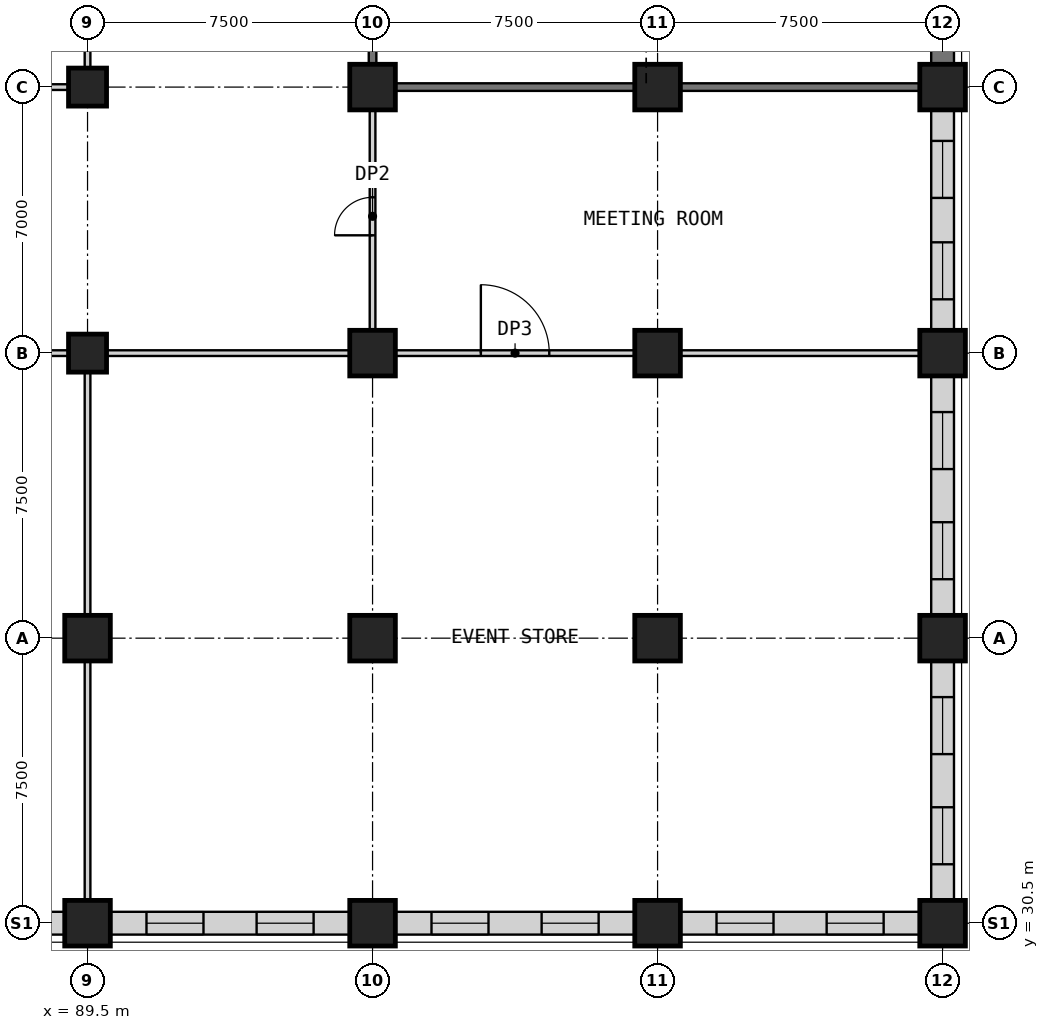
"""IFC4 building model, lengths in metres.
Left out: names, types, materials, properties, quantities, classifications, styles, units other than length and angle.
Written with IfcOpenShell. Run it as: python <this file> out.ifc"""

import sys

from ifc_helpers import new_model, si_unit, direction, frame, frame_2d, origin, origin_2d, place, context, subcontext, project, spatial, rectangle, extrude, element, fill, save


model = new_model("IFC4")
c1 = context("Model", 3, precision=1e-05, world=origin(), true_north=direction((0.0, 1.0)))
c2 = subcontext(c1, "Body", "Model", "MODEL_VIEW")
j1 = project(units=[si_unit("LENGTHUNIT", "METRE"), si_unit("PLANEANGLEUNIT", "RADIAN")], contexts=[c1])
p1 = place(None, origin())
s1 = spatial("IfcSite", under=j1, at=p1, CompositionType="ELEMENT")
p2 = place(p1, origin())
s2 = spatial("IfcBuilding", under=s1, at=p2, CompositionType="ELEMENT")
p3 = place(p2, frame((0.0, 0.0, 23.5)))
s3 = spatial("IfcBuildingStorey", under=s2, at=p3, CompositionType="ELEMENT", Elevation=23.5)
for number, where, z_axis, x_axis in (
    (1, (89.5, 45.5, 0.0), (0.0, 0.0, 1.0), (1.0, 0.0, 0.0)),
    (2, (89.5, 52.5, 0.0), (0.0, 0.0, 1.0), (1.0, 0.0, 0.0)),
):
    element("IfcColumn", number, at=place(p3, frame(where, z_axis=z_axis, x_axis=x_axis)), inside=s3, PredefinedType="COLUMN", context=c2, shape_type="SweptSolid", body=[
        extrude(rectangle(XDim=1.0, YDim=1.0, at=origin_2d()), origin(), (0.0, 0.0, 1.0), 5.5),
    ])
for number, where, z_axis, x_axis in (
    (3, (89.5, 30.5, 0.0), (0.0, 0.0, 1.0), (1.0, 0.0, 0.0)),
    (4, (89.5, 38.0, 0.0), (0.0, 0.0, 1.0), (1.0, 0.0, 0.0)),
    (5, (97.0, 30.5, 0.0), (0.0, 0.0, 1.0), (1.0, 0.0, 0.0)),
    (6, (97.0, 38.0, 0.0), (0.0, 0.0, 1.0), (1.0, 0.0, 0.0)),
    (7, (97.0, 45.5, 0.0), (0.0, 0.0, 1.0), (1.0, 0.0, 0.0)),
    (8, (97.0, 52.5, 0.0), (0.0, 0.0, 1.0), (1.0, 0.0, 0.0)),
    (9, (104.5, 30.5, 0.0), (0.0, 0.0, 1.0), (1.0, 0.0, 0.0)),
    (10, (104.5, 38.0, 0.0), (0.0, 0.0, 1.0), (1.0, 0.0, 0.0)),
    (11, (104.5, 45.5, 0.0), (0.0, 0.0, 1.0), (1.0, 0.0, 0.0)),
    (12, (104.5, 52.5, 0.0), (0.0, 0.0, 1.0), (1.0, 0.0, 0.0)),
    (13, (112.0, 30.5, 0.0), (0.0, 0.0, 1.0), (1.0, 0.0, 0.0)),
    (14, (112.0, 38.0, 0.0), (0.0, 0.0, 1.0), (1.0, 0.0, 0.0)),
    (15, (112.0, 45.5, 0.0), (0.0, 0.0, 1.0), (1.0, 0.0, 0.0)),
    (16, (112.0, 52.5, 0.0), (0.0, 0.0, 1.0), (1.0, 0.0, 0.0)),
):
    element("IfcColumn", number, at=place(p3, frame(where, z_axis=z_axis, x_axis=x_axis)), inside=s3, PredefinedType="COLUMN", context=c2, shape_type="SweptSolid", body=[
        extrude(rectangle(XDim=1.2, YDim=1.2, at=origin_2d()), origin(), (0.0, 0.0, 1.0), 5.5),
    ])
p4 = place(p3, frame((82.6, 30.5, 0.0), z_axis=(0.0, 0.0, 1.0), x_axis=(1.0, 0.0, 0.0)))
e17 = element("IfcWall", 17, at=p4, inside=s3, PredefinedType="PARTITIONING", context=c2, shape_type="SweptSolid", body=[
    extrude(rectangle(XDim=6.3, YDim=0.6, at=frame_2d((3.15, 0.0))), origin(), (0.0, 0.0, 1.0), 4.6),
])
p5 = place(p4, frame((0.951, 0.0, 0.9)))
e18 = element("IfcOpeningElement", 18, at=p5, cuts=e17, PredefinedType="OPENING", context=c2, shape_type="SweptSolid", body=[
    extrude(rectangle(XDim=1.5, YDim=2.8, at=frame_2d((0.75, 1.4))), frame((0.0, 0.31, 0.0), z_axis=(0.0, -1.0, 0.0), x_axis=(1.0, 0.0, 0.0)), (0.0, 0.0, 1.0), 0.62),
])
p6 = place(p4, frame((3.849, 0.0, 0.9)))
e19 = element("IfcOpeningElement", 19, at=p6, cuts=e17, PredefinedType="OPENING", context=c2, shape_type="SweptSolid", body=[
    extrude(rectangle(XDim=1.5, YDim=2.8, at=frame_2d((0.75, 1.4))), frame((0.0, 0.31, 0.0), z_axis=(0.0, -1.0, 0.0), x_axis=(1.0, 0.0, 0.0)), (0.0, 0.0, 1.0), 0.62),
])
p7 = place(p3, frame((90.1, 30.5, 0.0), z_axis=(0.0, 0.0, 1.0), x_axis=(1.0, 0.0, 0.0)))
e20 = element("IfcWall", 20, at=p7, inside=s3, PredefinedType="PARTITIONING", context=c2, shape_type="SweptSolid", body=[
    extrude(rectangle(XDim=6.3, YDim=0.6, at=frame_2d((3.15, 0.0))), origin(), (0.0, 0.0, 1.0), 4.6),
])
p8 = place(p7, frame((0.951, 0.0, 0.9)))
e21 = element("IfcOpeningElement", 21, at=p8, cuts=e20, PredefinedType="OPENING", context=c2, shape_type="SweptSolid", body=[
    extrude(rectangle(XDim=1.5, YDim=2.8, at=frame_2d((0.75, 1.4))), frame((0.0, 0.31, 0.0), z_axis=(0.0, -1.0, 0.0), x_axis=(1.0, 0.0, 0.0)), (0.0, 0.0, 1.0), 0.62),
])
p9 = place(p7, frame((3.849, 0.0, 0.9)))
e22 = element("IfcOpeningElement", 22, at=p9, cuts=e20, PredefinedType="OPENING", context=c2, shape_type="SweptSolid", body=[
    extrude(rectangle(XDim=1.5, YDim=2.8, at=frame_2d((0.75, 1.4))), frame((0.0, 0.31, 0.0), z_axis=(0.0, -1.0, 0.0), x_axis=(1.0, 0.0, 0.0)), (0.0, 0.0, 1.0), 0.62),
])
p10 = place(p3, frame((97.6, 30.5, 0.0), z_axis=(0.0, 0.0, 1.0), x_axis=(1.0, 0.0, 0.0)))
e23 = element("IfcWall", 23, at=p10, inside=s3, PredefinedType="PARTITIONING", context=c2, shape_type="SweptSolid", body=[
    extrude(rectangle(XDim=6.3, YDim=0.6, at=frame_2d((3.15, 0.0))), origin(), (0.0, 0.0, 1.0), 4.6),
])
p11 = place(p10, frame((0.951, 0.0, 0.9)))
e24 = element("IfcOpeningElement", 24, at=p11, cuts=e23, PredefinedType="OPENING", context=c2, shape_type="SweptSolid", body=[
    extrude(rectangle(XDim=1.5, YDim=2.8, at=frame_2d((0.75, 1.4))), frame((0.0, 0.31, 0.0), z_axis=(0.0, -1.0, 0.0), x_axis=(1.0, 0.0, 0.0)), (0.0, 0.0, 1.0), 0.62),
])
p12 = place(p10, frame((3.849, 0.0, 0.9)))
e25 = element("IfcOpeningElement", 25, at=p12, cuts=e23, PredefinedType="OPENING", context=c2, shape_type="SweptSolid", body=[
    extrude(rectangle(XDim=1.5, YDim=2.8, at=frame_2d((0.75, 1.4))), frame((0.0, 0.31, 0.0), z_axis=(0.0, -1.0, 0.0), x_axis=(1.0, 0.0, 0.0)), (0.0, 0.0, 1.0), 0.62),
])
p13 = place(p3, frame((105.1, 30.5, 0.0), z_axis=(0.0, 0.0, 1.0), x_axis=(1.0, 0.0, 0.0)))
e26 = element("IfcWall", 26, at=p13, inside=s3, PredefinedType="PARTITIONING", context=c2, shape_type="SweptSolid", body=[
    extrude(rectangle(XDim=6.3, YDim=0.6, at=frame_2d((3.15, 0.0))), origin(), (0.0, 0.0, 1.0), 4.6),
])
p14 = place(p13, frame((0.951, 0.0, 0.9)))
e27 = element("IfcOpeningElement", 27, at=p14, cuts=e26, PredefinedType="OPENING", context=c2, shape_type="SweptSolid", body=[
    extrude(rectangle(XDim=1.5, YDim=2.8, at=frame_2d((0.75, 1.4))), frame((0.0, 0.31, 0.0), z_axis=(0.0, -1.0, 0.0), x_axis=(1.0, 0.0, 0.0)), (0.0, 0.0, 1.0), 0.62),
])
p15 = place(p13, frame((3.849, 0.0, 0.9)))
e28 = element("IfcOpeningElement", 28, at=p15, cuts=e26, PredefinedType="OPENING", context=c2, shape_type="SweptSolid", body=[
    extrude(rectangle(XDim=1.5, YDim=2.8, at=frame_2d((0.75, 1.4))), frame((0.0, 0.31, 0.0), z_axis=(0.0, -1.0, 0.0), x_axis=(1.0, 0.0, 0.0)), (0.0, 0.0, 1.0), 0.62),
])
for number, where, z_axis, x_axis in (
    (29, (82.6, 45.5, 0.0), (0.0, 0.0, 1.0), (1.0, 0.0, 0.0)),
    (30, (90.0, 45.5, 0.0), (0.0, 0.0, 1.0), (1.0, 0.0, 0.0)),
):
    element("IfcWall", number, at=place(p3, frame(where, z_axis=z_axis, x_axis=x_axis)), inside=s3, PredefinedType="PARTITIONING", context=c2, shape_type="SweptSolid", body=[
        extrude(rectangle(XDim=6.4, YDim=0.15, at=frame_2d((3.2, 0.0))), origin(), (0.0, 0.0, 1.0), 5.2),
    ])
p16 = place(p3, frame((97.6, 45.5, 0.0), z_axis=(0.0, 0.0, 1.0), x_axis=(1.0, 0.0, 0.0)))
e31 = element("IfcWall", 31, at=p16, inside=s3, PredefinedType="PARTITIONING", context=c2, shape_type="SweptSolid", body=[
    extrude(rectangle(XDim=6.3, YDim=0.15, at=frame_2d((3.15, 0.0))), origin(), (0.0, 0.0, 1.0), 5.2),
])
p17 = place(p16, frame((2.25, 0.0, 0.0)))
e32 = element("IfcOpeningElement", 32, at=p17, cuts=e31, PredefinedType="OPENING", context=c2, shape_type="SweptSolid", body=[
    extrude(rectangle(XDim=1.8, YDim=2.4, at=frame_2d((0.9, 1.2))), frame((0.0, 0.085, 0.0), z_axis=(0.0, -1.0, 0.0), x_axis=(1.0, 0.0, 0.0)), (0.0, 0.0, 1.0), 0.17),
])
p18 = place(p3, frame((105.1, 45.5, 0.0), z_axis=(0.0, 0.0, 1.0), x_axis=(1.0, 0.0, 0.0)))
e33 = element("IfcWall", 33, at=p18, inside=s3, PredefinedType="PARTITIONING", context=c2, shape_type="SweptSolid", body=[
    extrude(rectangle(XDim=6.3, YDim=0.15, at=frame_2d((3.15, 0.0))), origin(), (0.0, 0.0, 1.0), 5.2),
])
p19 = place(p3, frame((89.0, 52.5, 0.0), z_axis=(0.0, 0.0, 1.0), x_axis=(-1.0, 0.0, 0.0)))
e34 = element("IfcWall", 34, at=p19, inside=s3, PredefinedType="PARTITIONING", context=c2, shape_type="SweptSolid", body=[
    extrude(rectangle(XDim=6.4, YDim=0.15, at=frame_2d((3.2, 0.0))), origin(), (0.0, 0.0, 1.0), 5.2),
])
p20 = place(p19, frame((4.1, 0.0, 0.0)))
e35 = element("IfcOpeningElement", 35, at=p20, cuts=e34, PredefinedType="OPENING", context=c2, shape_type="SweptSolid", body=[
    extrude(rectangle(XDim=1.8, YDim=2.4, at=frame_2d((0.9, 1.2))), frame((0.0, 0.085, 0.0), z_axis=(0.0, -1.0, 0.0), x_axis=(1.0, 0.0, 0.0)), (0.0, 0.0, 1.0), 0.17),
])
for number, where, z_axis, x_axis in (
    (36, (97.6, 52.5, 0.0), (0.0, 0.0, 1.0), (1.0, 0.0, 0.0)),
    (37, (105.1, 52.5, 0.0), (0.0, 0.0, 1.0), (1.0, 0.0, 0.0)),
):
    element("IfcWall", number, at=place(p3, frame(where, z_axis=z_axis, x_axis=x_axis)), inside=s3, PredefinedType="SHEAR", context=c2, shape_type="SweptSolid", body=[
        extrude(rectangle(XDim=6.3, YDim=0.2, at=frame_2d((3.15, 0.0))), origin(), (0.0, 0.0, 1.0), 5.2),
    ])
p21 = place(p3, frame((97.0, 46.1, 0.0), z_axis=(0.0, 0.0, 1.0), x_axis=(0.0, 1.0, 0.0)))
e38 = element("IfcWall", 38, at=p21, inside=s3, PredefinedType="PARTITIONING", context=c2, shape_type="SweptSolid", body=[
    extrude(rectangle(XDim=5.8, YDim=0.15, at=frame_2d((2.9, 0.0))), origin(), (0.0, 0.0, 1.0), 5.2),
])
p22 = place(p21, frame((2.5, 0.0, 0.0)))
e39 = element("IfcOpeningElement", 39, at=p22, cuts=e38, PredefinedType="OPENING", context=c2, shape_type="SweptSolid", body=[
    extrude(rectangle(XDim=1.0, YDim=2.1, at=frame_2d((0.5, 1.05))), frame((0.0, 0.085, 0.0), z_axis=(0.0, -1.0, 0.0), x_axis=(1.0, 0.0, 0.0)), (0.0, 0.0, 1.0), 0.17),
])
p23 = place(p3, frame((97.0, 59.4, 0.0), z_axis=(0.0, 0.0, 1.0), x_axis=(0.0, -1.0, 0.0)))
e40 = element("IfcWall", 40, at=p23, inside=s3, PredefinedType="SHEAR", context=c2, shape_type="SweptSolid", body=[
    extrude(rectangle(XDim=6.3, YDim=0.2, at=frame_2d((3.15, 0.0))), origin(), (0.0, 0.0, 1.0), 5.2),
])
p24 = place(p23, frame((2.6, 0.0, 0.0)))
e41 = element("IfcOpeningElement", 41, at=p24, cuts=e40, PredefinedType="OPENING", context=c2, shape_type="SweptSolid", body=[
    extrude(rectangle(XDim=1.2, YDim=2.1, at=frame_2d((0.6, 1.05))), frame((0.0, 0.11, 0.0), z_axis=(0.0, -1.0, 0.0), x_axis=(1.0, 0.0, 0.0)), (0.0, 0.0, 1.0), 0.22),
])
p25 = place(p3, frame((112.0, 31.1, 0.0), z_axis=(0.0, 0.0, 1.0), x_axis=(0.0, 1.0, 0.0)))
e42 = element("IfcWall", 42, at=p25, inside=s3, PredefinedType="PARTITIONING", context=c2, shape_type="SweptSolid", body=[
    extrude(rectangle(XDim=6.3, YDim=0.6, at=frame_2d((3.15, 0.0))), origin(), (0.0, 0.0, 1.0), 4.6),
])
p26 = place(p25, frame((0.951, 0.0, 0.9)))
e43 = element("IfcOpeningElement", 43, at=p26, cuts=e42, PredefinedType="OPENING", context=c2, shape_type="SweptSolid", body=[
    extrude(rectangle(XDim=1.5, YDim=2.8, at=frame_2d((0.75, 1.4))), frame((0.0, 0.31, 0.0), z_axis=(0.0, -1.0, 0.0), x_axis=(1.0, 0.0, 0.0)), (0.0, 0.0, 1.0), 0.62),
])
p27 = place(p25, frame((3.849, 0.0, 0.9)))
e44 = element("IfcOpeningElement", 44, at=p27, cuts=e42, PredefinedType="OPENING", context=c2, shape_type="SweptSolid", body=[
    extrude(rectangle(XDim=1.5, YDim=2.8, at=frame_2d((0.75, 1.4))), frame((0.0, 0.31, 0.0), z_axis=(0.0, -1.0, 0.0), x_axis=(1.0, 0.0, 0.0)), (0.0, 0.0, 1.0), 0.62),
])
p28 = place(p3, frame((112.0, 38.6, 0.0), z_axis=(0.0, 0.0, 1.0), x_axis=(0.0, 1.0, 0.0)))
e45 = element("IfcWall", 45, at=p28, inside=s3, PredefinedType="PARTITIONING", context=c2, shape_type="SweptSolid", body=[
    extrude(rectangle(XDim=6.3, YDim=0.6, at=frame_2d((3.15, 0.0))), origin(), (0.0, 0.0, 1.0), 4.6),
])
p29 = place(p28, frame((0.951, 0.0, 0.9)))
e46 = element("IfcOpeningElement", 46, at=p29, cuts=e45, PredefinedType="OPENING", context=c2, shape_type="SweptSolid", body=[
    extrude(rectangle(XDim=1.5, YDim=2.8, at=frame_2d((0.75, 1.4))), frame((0.0, 0.31, 0.0), z_axis=(0.0, -1.0, 0.0), x_axis=(1.0, 0.0, 0.0)), (0.0, 0.0, 1.0), 0.62),
])
p30 = place(p28, frame((3.849, 0.0, 0.9)))
e47 = element("IfcOpeningElement", 47, at=p30, cuts=e45, PredefinedType="OPENING", context=c2, shape_type="SweptSolid", body=[
    extrude(rectangle(XDim=1.5, YDim=2.8, at=frame_2d((0.75, 1.4))), frame((0.0, 0.31, 0.0), z_axis=(0.0, -1.0, 0.0), x_axis=(1.0, 0.0, 0.0)), (0.0, 0.0, 1.0), 0.62),
])
p31 = place(p3, frame((112.0, 46.1, 0.0), z_axis=(0.0, 0.0, 1.0), x_axis=(0.0, 1.0, 0.0)))
e48 = element("IfcWall", 48, at=p31, inside=s3, PredefinedType="PARTITIONING", context=c2, shape_type="SweptSolid", body=[
    extrude(rectangle(XDim=5.8, YDim=0.6, at=frame_2d((2.9, 0.0))), origin(), (0.0, 0.0, 1.0), 4.6),
])
p32 = place(p31, frame((0.816, 0.0, 0.9)))
e49 = element("IfcOpeningElement", 49, at=p32, cuts=e48, PredefinedType="OPENING", context=c2, shape_type="SweptSolid", body=[
    extrude(rectangle(XDim=1.5, YDim=2.8, at=frame_2d((0.75, 1.4))), frame((0.0, 0.31, 0.0), z_axis=(0.0, -1.0, 0.0), x_axis=(1.0, 0.0, 0.0)), (0.0, 0.0, 1.0), 0.62),
])
p33 = place(p31, frame((3.484, 0.0, 0.9)))
e50 = element("IfcOpeningElement", 50, at=p33, cuts=e48, PredefinedType="OPENING", context=c2, shape_type="SweptSolid", body=[
    extrude(rectangle(XDim=1.5, YDim=2.8, at=frame_2d((0.75, 1.4))), frame((0.0, 0.31, 0.0), z_axis=(0.0, -1.0, 0.0), x_axis=(1.0, 0.0, 0.0)), (0.0, 0.0, 1.0), 0.62),
])
p34 = place(p3, frame((112.0, 53.1, 0.0), z_axis=(0.0, 0.0, 1.0), x_axis=(0.0, 1.0, 0.0)))
e51 = element("IfcWall", 51, at=p34, inside=s3, PredefinedType="PARTITIONING", context=c2, shape_type="SweptSolid", body=[
    extrude(rectangle(XDim=6.3, YDim=0.6, at=frame_2d((3.15, 0.0))), origin(), (0.0, 0.0, 1.0), 4.6),
])
p35 = place(p3, frame((89.5, 31.1, 0.0), z_axis=(0.0, 0.0, 1.0), x_axis=(0.0, 1.0, 0.0)))
e52 = element("IfcWall", 52, at=p35, inside=s3, PredefinedType="PARTITIONING", context=c2, shape_type="SweptSolid", body=[
    extrude(rectangle(XDim=6.3, YDim=0.15, at=frame_2d((3.15, 0.0))), origin(), (0.0, 0.0, 1.0), 5.2),
])
p36 = place(p3, frame((89.5, 38.6, 0.0), z_axis=(0.0, 0.0, 1.0), x_axis=(0.0, 1.0, 0.0)))
e53 = element("IfcWall", 53, at=p36, inside=s3, PredefinedType="PARTITIONING", context=c2, shape_type="SweptSolid", body=[
    extrude(rectangle(XDim=6.4, YDim=0.15, at=frame_2d((3.2, 0.0))), origin(), (0.0, 0.0, 1.0), 5.2),
])
p37 = place(p3, frame((89.5, 53.0, 0.0), z_axis=(0.0, 0.0, 1.0), x_axis=(0.0, 1.0, 0.0)))
e54 = element("IfcWall", 54, at=p37, inside=s3, PredefinedType="PARTITIONING", context=c2, shape_type="SweptSolid", body=[
    extrude(rectangle(XDim=6.5, YDim=0.15, at=frame_2d((3.25, 0.0))), origin(), (0.0, 0.0, 1.0), 5.2),
])
p38 = place(p8, origin())
e55 = element("IfcWindow", 55, at=p38, inside=s3, PartitioningType="SINGLE_PANEL", PredefinedType="WINDOW", context=c2, shape_type="SweptSolid", body=[
    extrude(rectangle(XDim=1.5, YDim=2.8, at=frame_2d((0.75, 1.4))), frame((0.0, 0.03, 0.0), z_axis=(0.0, -1.0, 0.0), x_axis=(1.0, 0.0, 0.0)), (0.0, 0.0, 1.0), 0.06),
])
fill(e21, e55)
p39 = place(p9, origin())
e56 = element("IfcWindow", 56, at=p39, inside=s3, PartitioningType="SINGLE_PANEL", PredefinedType="WINDOW", context=c2, shape_type="SweptSolid", body=[
    extrude(rectangle(XDim=1.5, YDim=2.8, at=frame_2d((0.75, 1.4))), frame((0.0, 0.03, 0.0), z_axis=(0.0, -1.0, 0.0), x_axis=(1.0, 0.0, 0.0)), (0.0, 0.0, 1.0), 0.06),
])
fill(e22, e56)
p40 = place(p11, origin())
e57 = element("IfcWindow", 57, at=p40, inside=s3, PartitioningType="SINGLE_PANEL", PredefinedType="WINDOW", context=c2, shape_type="SweptSolid", body=[
    extrude(rectangle(XDim=1.5, YDim=2.8, at=frame_2d((0.75, 1.4))), frame((0.0, 0.03, 0.0), z_axis=(0.0, -1.0, 0.0), x_axis=(1.0, 0.0, 0.0)), (0.0, 0.0, 1.0), 0.06),
])
fill(e24, e57)
p41 = place(p12, origin())
e58 = element("IfcWindow", 58, at=p41, inside=s3, PartitioningType="SINGLE_PANEL", PredefinedType="WINDOW", context=c2, shape_type="SweptSolid", body=[
    extrude(rectangle(XDim=1.5, YDim=2.8, at=frame_2d((0.75, 1.4))), frame((0.0, 0.03, 0.0), z_axis=(0.0, -1.0, 0.0), x_axis=(1.0, 0.0, 0.0)), (0.0, 0.0, 1.0), 0.06),
])
fill(e25, e58)
p42 = place(p14, origin())
e59 = element("IfcWindow", 59, at=p42, inside=s3, PartitioningType="SINGLE_PANEL", PredefinedType="WINDOW", context=c2, shape_type="SweptSolid", body=[
    extrude(rectangle(XDim=1.5, YDim=2.8, at=frame_2d((0.75, 1.4))), frame((0.0, 0.03, 0.0), z_axis=(0.0, -1.0, 0.0), x_axis=(1.0, 0.0, 0.0)), (0.0, 0.0, 1.0), 0.06),
])
fill(e27, e59)
p43 = place(p15, origin())
e60 = element("IfcWindow", 60, at=p43, inside=s3, PartitioningType="SINGLE_PANEL", PredefinedType="WINDOW", context=c2, shape_type="SweptSolid", body=[
    extrude(rectangle(XDim=1.5, YDim=2.8, at=frame_2d((0.75, 1.4))), frame((0.0, 0.03, 0.0), z_axis=(0.0, -1.0, 0.0), x_axis=(1.0, 0.0, 0.0)), (0.0, 0.0, 1.0), 0.06),
])
fill(e28, e60)
p44 = place(p17, origin())
e61 = element("IfcDoor", 61, at=p44, inside=s3, OperationType="SINGLE_SWING_LEFT", PredefinedType="DOOR", context=c2, shape_type="SweptSolid", body=[
    extrude(rectangle(XDim=1.8, YDim=2.4, at=frame_2d((0.9, 1.2))), frame((0.0, 0.025, 0.0), z_axis=(0.0, -1.0, 0.0), x_axis=(1.0, 0.0, 0.0)), (0.0, 0.0, 1.0), 0.05),
])
fill(e32, e61)
p45 = place(p22, origin())
e62 = element("IfcDoor", 62, at=p45, inside=s3, OperationType="SINGLE_SWING_LEFT", PredefinedType="DOOR", context=c2, shape_type="SweptSolid", body=[
    extrude(rectangle(XDim=1.0, YDim=2.1, at=frame_2d((0.5, 1.05))), frame((0.0, 0.025, 0.0), z_axis=(0.0, -1.0, 0.0), x_axis=(1.0, 0.0, 0.0)), (0.0, 0.0, 1.0), 0.05),
])
fill(e39, e62)
p46 = place(p26, origin())
e63 = element("IfcWindow", 63, at=p46, inside=s3, PartitioningType="SINGLE_PANEL", PredefinedType="WINDOW", context=c2, shape_type="SweptSolid", body=[
    extrude(rectangle(XDim=1.5, YDim=2.8, at=frame_2d((0.75, 1.4))), frame((0.0, 0.03, 0.0), z_axis=(0.0, -1.0, 0.0), x_axis=(1.0, 0.0, 0.0)), (0.0, 0.0, 1.0), 0.06),
])
fill(e43, e63)
p47 = place(p27, origin())
e64 = element("IfcWindow", 64, at=p47, inside=s3, PartitioningType="SINGLE_PANEL", PredefinedType="WINDOW", context=c2, shape_type="SweptSolid", body=[
    extrude(rectangle(XDim=1.5, YDim=2.8, at=frame_2d((0.75, 1.4))), frame((0.0, 0.03, 0.0), z_axis=(0.0, -1.0, 0.0), x_axis=(1.0, 0.0, 0.0)), (0.0, 0.0, 1.0), 0.06),
])
fill(e44, e64)
p48 = place(p29, origin())
e65 = element("IfcWindow", 65, at=p48, inside=s3, PartitioningType="SINGLE_PANEL", PredefinedType="WINDOW", context=c2, shape_type="SweptSolid", body=[
    extrude(rectangle(XDim=1.5, YDim=2.8, at=frame_2d((0.75, 1.4))), frame((0.0, 0.03, 0.0), z_axis=(0.0, -1.0, 0.0), x_axis=(1.0, 0.0, 0.0)), (0.0, 0.0, 1.0), 0.06),
])
fill(e46, e65)
p49 = place(p30, origin())
e66 = element("IfcWindow", 66, at=p49, inside=s3, PartitioningType="SINGLE_PANEL", PredefinedType="WINDOW", context=c2, shape_type="SweptSolid", body=[
    extrude(rectangle(XDim=1.5, YDim=2.8, at=frame_2d((0.75, 1.4))), frame((0.0, 0.03, 0.0), z_axis=(0.0, -1.0, 0.0), x_axis=(1.0, 0.0, 0.0)), (0.0, 0.0, 1.0), 0.06),
])
fill(e47, e66)
p50 = place(p32, origin())
e67 = element("IfcWindow", 67, at=p50, inside=s3, PartitioningType="SINGLE_PANEL", PredefinedType="WINDOW", context=c2, shape_type="SweptSolid", body=[
    extrude(rectangle(XDim=1.5, YDim=2.8, at=frame_2d((0.75, 1.4))), frame((0.0, 0.03, 0.0), z_axis=(0.0, -1.0, 0.0), x_axis=(1.0, 0.0, 0.0)), (0.0, 0.0, 1.0), 0.06),
])
fill(e49, e67)
p51 = place(p33, origin())
e68 = element("IfcWindow", 68, at=p51, inside=s3, PartitioningType="SINGLE_PANEL", PredefinedType="WINDOW", context=c2, shape_type="SweptSolid", body=[
    extrude(rectangle(XDim=1.5, YDim=2.8, at=frame_2d((0.75, 1.4))), frame((0.0, 0.03, 0.0), z_axis=(0.0, -1.0, 0.0), x_axis=(1.0, 0.0, 0.0)), (0.0, 0.0, 1.0), 0.06),
])
fill(e50, e68)
save(model, sys.argv[1])
